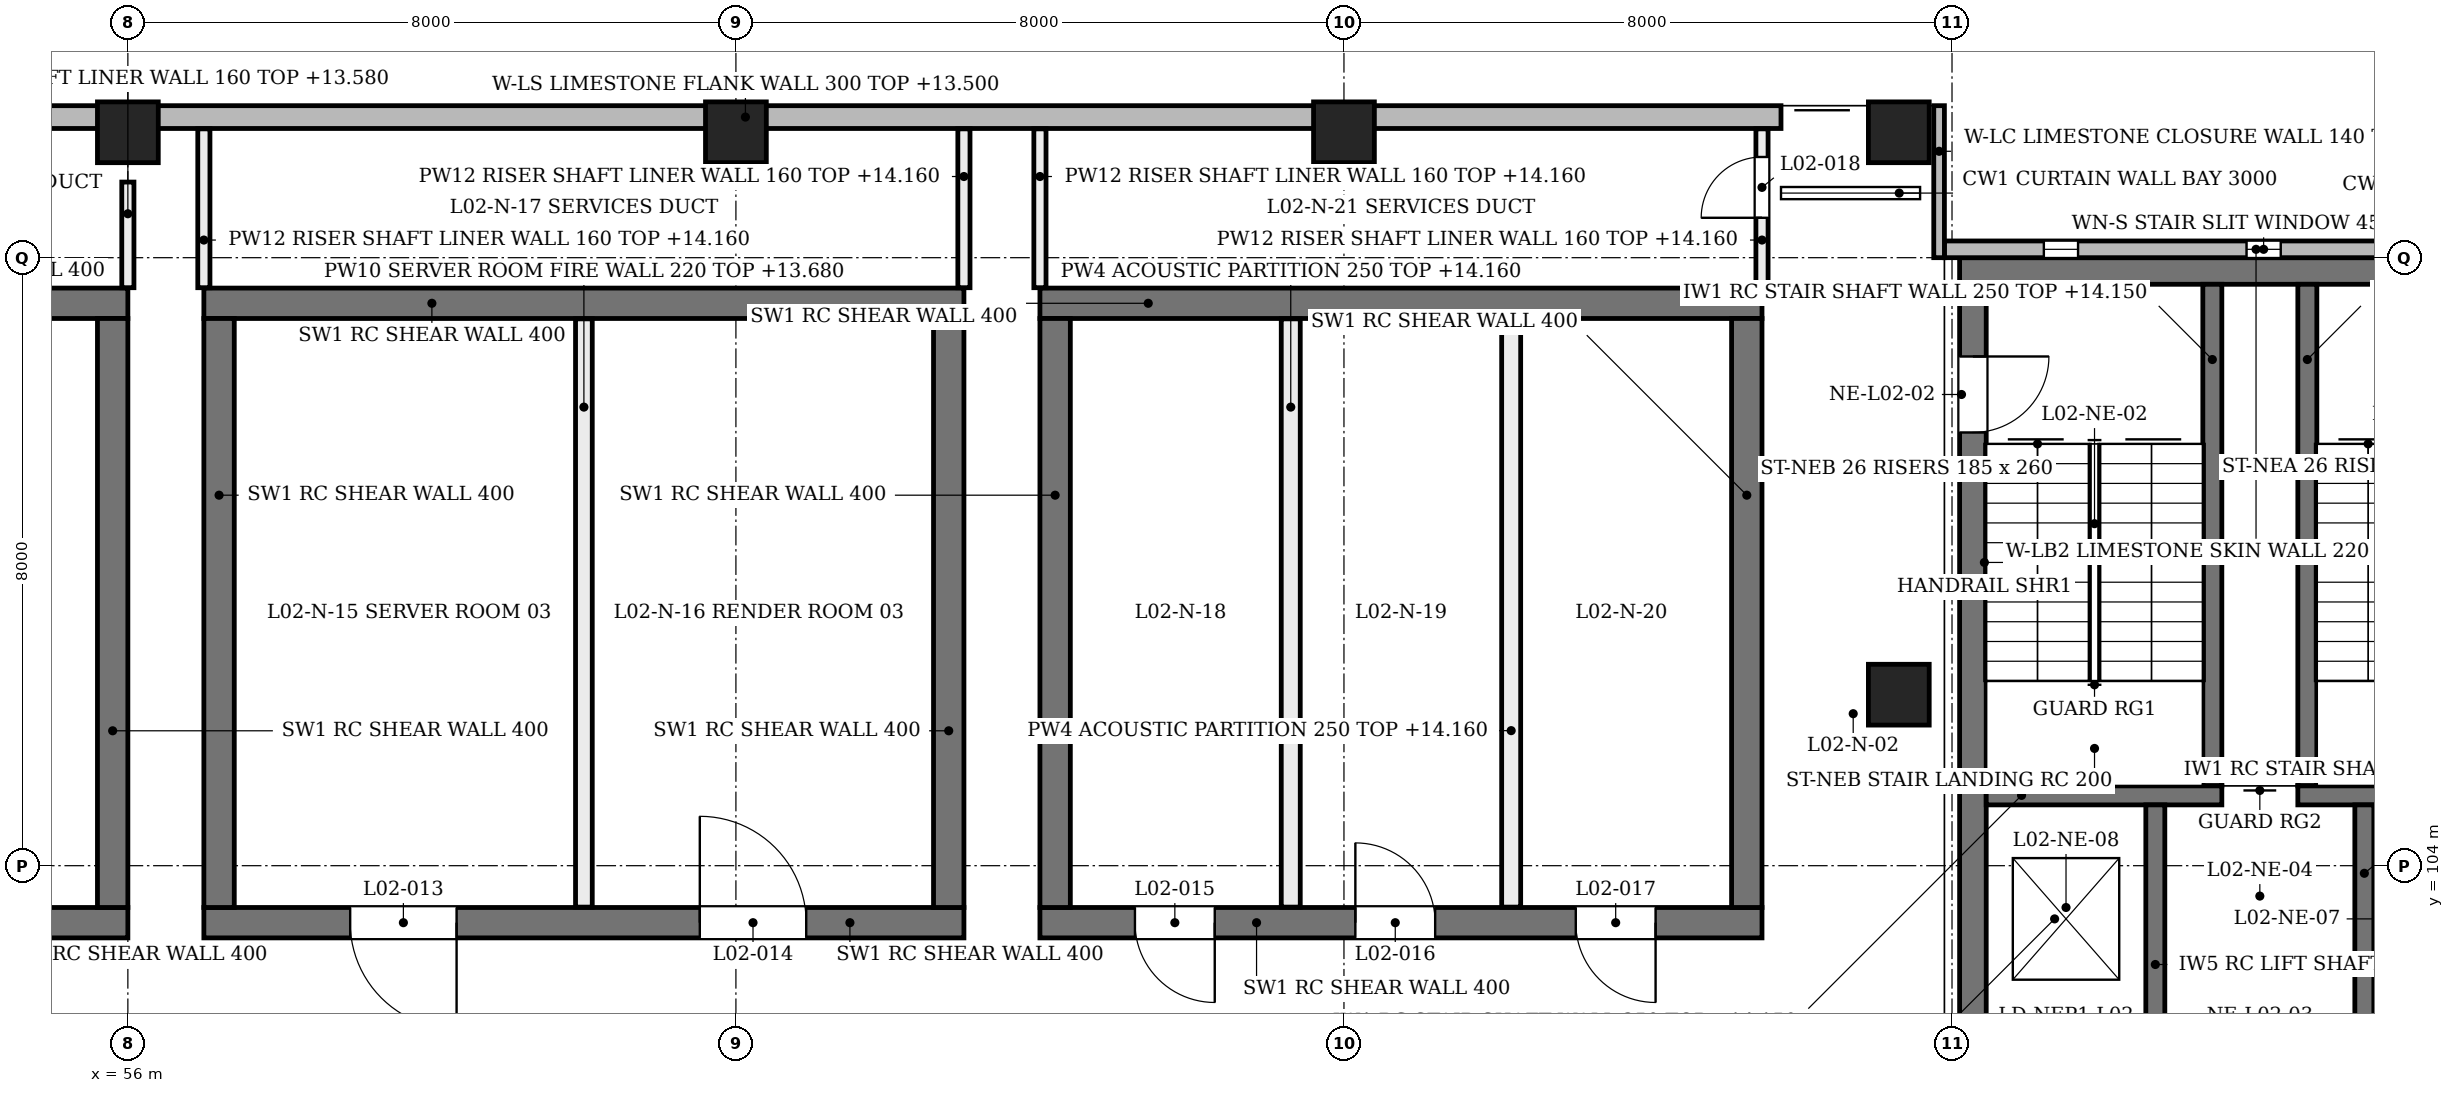
"""IFC4 building model, lengths in metres.
Left out: names, types, materials, properties, quantities, classifications, styles, units other than length and angle.
Written with IfcOpenShell. Run it as: python <this file> out.ifc"""

import sys

from ifc_helpers import new_model, si_unit, direction, frame, frame_2d, origin, origin_2d, place, context, subcontext, project, spatial, rectangle, extrude, element, fill, save


model = new_model("IFC4")
c1 = context("Model", 3, precision=1e-05, world=origin(), true_north=direction((0.0, 1.0)))
c2 = subcontext(c1, "Body", "Model", "MODEL_VIEW")
j1 = project(units=[si_unit("LENGTHUNIT", "METRE"), si_unit("PLANEANGLEUNIT", "RADIAN")], contexts=[c1])
p1 = place(None, origin())
s1 = spatial("IfcSite", under=j1, at=p1, CompositionType="ELEMENT")
p2 = place(p1, origin())
s2 = spatial("IfcBuilding", under=s1, at=p2, CompositionType="ELEMENT")
p3 = place(p2, frame((0.0, 0.0, 9.6)))
s3 = spatial("IfcBuildingStorey", under=s2, at=p3, CompositionType="ELEMENT", Elevation=9.6)
p4 = place(p3, frame((46.0, 103.25, 0.0), z_axis=(0.0, 0.0, 1.0), x_axis=(1.0, 0.0, 0.0)))
e1 = element("IfcWall", 1, at=p4, inside=s3, PredefinedType="SHEAR", context=c2, shape_type="SweptSolid", body=[
    extrude(rectangle(XDim=10.0, YDim=0.4, at=frame_2d((5.0, 0.0))), origin(), (0.0, 0.0, 1.0), 4.58),
])
p5 = place(p4, frame((2.025, 0.0, 0.0)))
e2 = element("IfcOpeningElement", 2, at=p5, cuts=e1, PredefinedType="OPENING", context=c2, shape_type="SweptSolid", body=[
    extrude(rectangle(XDim=1.2, YDim=2.2, at=frame_2d((0.6, 1.1))), frame((0.0, 0.21, 0.0), z_axis=(0.0, -1.0, 0.0), x_axis=(1.0, 0.0, 0.0)), (0.0, 0.0, 1.0), 0.42),
])
p6 = place(p4, frame((6.625, 0.0, 0.0)))
e3 = element("IfcOpeningElement", 3, at=p6, cuts=e1, PredefinedType="OPENING", context=c2, shape_type="SweptSolid", body=[
    extrude(rectangle(XDim=1.2, YDim=2.2, at=frame_2d((0.6, 1.1))), frame((0.0, 0.21, 0.0), z_axis=(0.0, -1.0, 0.0), x_axis=(1.0, 0.0, 0.0)), (0.0, 0.0, 1.0), 0.42),
])
p7 = place(p3, frame((46.0, 111.4, 0.0), z_axis=(0.0, 0.0, 1.0), x_axis=(1.0, 0.0, 0.0)))
e4 = element("IfcWall", 4, at=p7, inside=s3, PredefinedType="SHEAR", context=c2, shape_type="SweptSolid", body=[
    extrude(rectangle(XDim=10.0, YDim=0.4, at=frame_2d((5.0, 0.0))), origin(), (0.0, 0.0, 1.0), 4.58),
])
p8 = place(p3, frame((55.8, 103.45, 0.0), z_axis=(0.0, 0.0, 1.0), x_axis=(0.0, 1.0, 0.0)))
e5 = element("IfcWall", 5, at=p8, inside=s3, PredefinedType="SHEAR", context=c2, shape_type="SweptSolid", body=[
    extrude(rectangle(XDim=7.75, YDim=0.4, at=frame_2d((3.875, 0.0))), origin(), (0.0, 0.0, 1.0), 4.58),
])
p9 = place(p3, frame((57.0, 103.25, 0.0), z_axis=(0.0, 0.0, 1.0), x_axis=(1.0, 0.0, 0.0)))
e6 = element("IfcWall", 6, at=p9, inside=s3, PredefinedType="SHEAR", context=c2, shape_type="SweptSolid", body=[
    extrude(rectangle(XDim=10.0, YDim=0.4, at=frame_2d((5.0, 0.0))), origin(), (0.0, 0.0, 1.0), 4.58),
])
p10 = place(p9, frame((1.925, 0.0, 0.0)))
e7 = element("IfcOpeningElement", 7, at=p10, cuts=e6, PredefinedType="OPENING", context=c2, shape_type="SweptSolid", body=[
    extrude(rectangle(XDim=1.4, YDim=2.1, at=frame_2d((0.7, 1.05))), frame((0.0, 0.21, 0.0), z_axis=(0.0, -1.0, 0.0), x_axis=(1.0, 0.0, 0.0)), (0.0, 0.0, 1.0), 0.42),
])
p11 = place(p9, frame((6.525, 0.0, 0.0)))
e8 = element("IfcOpeningElement", 8, at=p11, cuts=e6, PredefinedType="OPENING", context=c2, shape_type="SweptSolid", body=[
    extrude(rectangle(XDim=1.4, YDim=2.1, at=frame_2d((0.7, 1.05))), frame((0.0, 0.21, 0.0), z_axis=(0.0, -1.0, 0.0), x_axis=(1.0, 0.0, 0.0)), (0.0, 0.0, 1.0), 0.42),
])
p12 = place(p3, frame((57.0, 111.4, 0.0), z_axis=(0.0, 0.0, 1.0), x_axis=(1.0, 0.0, 0.0)))
e9 = element("IfcWall", 9, at=p12, inside=s3, PredefinedType="SHEAR", context=c2, shape_type="SweptSolid", body=[
    extrude(rectangle(XDim=10.0, YDim=0.4, at=frame_2d((5.0, 0.0))), origin(), (0.0, 0.0, 1.0), 4.58),
])
for number, where, z_axis, x_axis in (
    (10, (57.2, 103.45, 0.0), (0.0, 0.0, 1.0), (0.0, 1.0, 0.0)),
    (11, (66.8, 103.45, 0.0), (0.0, 0.0, 1.0), (0.0, 1.0, 0.0)),
):
    element("IfcWall", number, at=place(p3, frame(where, z_axis=z_axis, x_axis=x_axis)), inside=s3, PredefinedType="SHEAR", context=c2, shape_type="SweptSolid", body=[
        extrude(rectangle(XDim=7.75, YDim=0.4, at=frame_2d((3.875, 0.0))), origin(), (0.0, 0.0, 1.0), 4.58),
    ])
p13 = place(p3, frame((68.0, 103.25, 0.0), z_axis=(0.0, 0.0, 1.0), x_axis=(1.0, 0.0, 0.0)))
e12 = element("IfcWall", 12, at=p13, inside=s3, PredefinedType="SHEAR", context=c2, shape_type="SweptSolid", body=[
    extrude(rectangle(XDim=9.5, YDim=0.4, at=frame_2d((4.75, 0.0))), origin(), (0.0, 0.0, 1.0), 4.58),
])
p14 = place(p13, frame((1.25, 0.0, 0.0)))
e13 = element("IfcOpeningElement", 13, at=p14, cuts=e12, PredefinedType="OPENING", context=c2, shape_type="SweptSolid", body=[
    extrude(rectangle(XDim=1.05, YDim=2.2, at=frame_2d((0.525, 1.1))), frame((0.0, 0.21, 0.0), z_axis=(0.0, -1.0, 0.0), x_axis=(1.0, 0.0, 0.0)), (0.0, 0.0, 1.0), 0.42),
])
p15 = place(p13, frame((4.15, 0.0, 0.0)))
e14 = element("IfcOpeningElement", 14, at=p15, cuts=e12, PredefinedType="OPENING", context=c2, shape_type="SweptSolid", body=[
    extrude(rectangle(XDim=1.05, YDim=2.2, at=frame_2d((0.525, 1.1))), frame((0.0, 0.21, 0.0), z_axis=(0.0, -1.0, 0.0), x_axis=(1.0, 0.0, 0.0)), (0.0, 0.0, 1.0), 0.42),
])
p16 = place(p13, frame((7.05, 0.0, 0.0)))
e15 = element("IfcOpeningElement", 15, at=p16, cuts=e12, PredefinedType="OPENING", context=c2, shape_type="SweptSolid", body=[
    extrude(rectangle(XDim=1.05, YDim=2.2, at=frame_2d((0.525, 1.1))), frame((0.0, 0.21, 0.0), z_axis=(0.0, -1.0, 0.0), x_axis=(1.0, 0.0, 0.0)), (0.0, 0.0, 1.0), 0.42),
])
p17 = place(p3, frame((68.0, 111.4, 0.0), z_axis=(0.0, 0.0, 1.0), x_axis=(1.0, 0.0, 0.0)))
e16 = element("IfcWall", 16, at=p17, inside=s3, PredefinedType="SHEAR", context=c2, shape_type="SweptSolid", body=[
    extrude(rectangle(XDim=9.5, YDim=0.4, at=frame_2d((4.75, 0.0))), origin(), (0.0, 0.0, 1.0), 4.58),
])
for number, where, z_axis, x_axis in (
    (17, (68.2, 103.45, 0.0), (0.0, 0.0, 1.0), (0.0, 1.0, 0.0)),
    (18, (77.3, 103.45, 0.0), (0.0, 0.0, 1.0), (0.0, 1.0, 0.0)),
):
    element("IfcWall", number, at=place(p3, frame(where, z_axis=z_axis, x_axis=x_axis)), inside=s3, PredefinedType="SHEAR", context=c2, shape_type="SweptSolid", body=[
        extrude(rectangle(XDim=7.75, YDim=0.4, at=frame_2d((3.875, 0.0))), origin(), (0.0, 0.0, 1.0), 4.58),
    ])
p18 = place(p3, frame((80.1, 111.825, 0.0), z_axis=(0.0, 0.0, 1.0), x_axis=(1.0, 0.0, 0.0)))
e19 = element("IfcWall", 19, at=p18, inside=s3, PredefinedType="SHEAR", context=c2, shape_type="SweptSolid", body=[
    extrude(rectangle(XDim=7.9, YDim=0.35, at=frame_2d((3.95, 0.0))), origin(), (0.0, 0.0, 1.0), 4.58),
])
p19 = place(p3, frame((80.275, 96.45, 0.0), z_axis=(0.0, 0.0, 1.0), x_axis=(0.0, 1.0, 0.0)))
e20 = element("IfcWall", 20, at=p19, inside=s3, PredefinedType="SHEAR", context=c2, shape_type="SweptSolid", body=[
    extrude(rectangle(XDim=15.2, YDim=0.35, at=frame_2d((7.6, 0.0))), origin(), (0.0, 0.0, 1.0), 4.58),
])
p20 = place(p19, frame((13.25, 0.0, 0.0)))
e21 = element("IfcOpeningElement", 21, at=p20, cuts=e20, PredefinedType="OPENING", context=c2, shape_type="SweptSolid", body=[
    extrude(rectangle(XDim=1.0, YDim=2.1, at=frame_2d((0.5, 1.05))), frame((0.0, 0.185, 0.0), z_axis=(0.0, -1.0, 0.0), x_axis=(1.0, 0.0, 0.0)), (0.0, 0.0, 1.0), 0.37),
])
p21 = place(p19, frame((3.6, 0.0, 0.0)))
e22 = element("IfcOpeningElement", 22, at=p21, cuts=e20, PredefinedType="OPENING", context=c2, shape_type="SweptSolid", body=[
    extrude(rectangle(XDim=1.0, YDim=2.1, at=frame_2d((0.5, 1.05))), frame((0.0, 0.185, 0.0), z_axis=(0.0, -1.0, 0.0), x_axis=(1.0, 0.0, 0.0)), (0.0, 0.0, 1.0), 0.37),
])
for number, where, z_axis, x_axis in (
    (23, (79.3, 106.0, 0.0), (0.0, 0.204, 0.979), (-1.0, 0.0, 0.0)),
    (24, (56.0, 113.4, 0.0), (0.0, 0.204, 0.979), (-1.0, 0.0, 0.0)),
    (25, (64.0, 113.4, 0.0), (0.0, 0.204, 0.979), (-1.0, 0.0, 0.0)),
    (26, (72.0, 113.4, 0.0), (0.0, 0.204, 0.979), (-1.0, 0.0, 0.0)),
    (27, (79.3, 113.4, 0.0), (0.0, 0.204, 0.979), (-1.0, 0.0, 0.0)),
):
    element("IfcColumn", number, at=place(p3, frame(where, z_axis=z_axis, x_axis=x_axis)), inside=s3, PredefinedType="COLUMN", context=c2, shape_type="SweptSolid", body=[
        extrude(rectangle(XDim=0.8, YDim=0.8, at=origin_2d()), origin(), (0.0, 0.0, 1.0), 4.903),
    ])
p22 = place(p3, frame((26.25, 113.85, 0.0), z_axis=(0.0, 0.0, 1.0), x_axis=(1.0, 0.0, 0.0)))
e28 = element("IfcWall", 28, at=p22, inside=s3, PredefinedType="SOLIDWALL", context=c2, shape_type="SweptSolid", body=[
    extrude(rectangle(XDim=51.5, YDim=0.3, at=frame_2d((25.75, 0.0))), origin(), (0.0, 0.0, 1.0), 3.9),
])
p23 = place(p3, frame((79.9, 112.11, 0.0), z_axis=(0.0, 0.0, 1.0), x_axis=(1.0, 0.0, 0.0)))
e29 = element("IfcWall", 29, at=p23, inside=s3, PredefinedType="SOLIDWALL", context=c2, shape_type="SweptSolid", body=[
    extrude(rectangle(XDim=8.2, YDim=0.22, at=frame_2d((4.1, 0.0))), origin(), (0.0, 0.0, 1.0), 3.9),
])
p24 = place(p23, frame((1.308, 0.0, 0.9)))
e30 = element("IfcOpeningElement", 30, at=p24, cuts=e29, PredefinedType="OPENING", context=c2, shape_type="SweptSolid", body=[
    extrude(rectangle(XDim=0.45, YDim=2.6, at=frame_2d((0.225, 1.3))), frame((0.0, 0.12, 0.0), z_axis=(0.0, -1.0, 0.0), x_axis=(1.0, 0.0, 0.0)), (0.0, 0.0, 1.0), 0.24),
])
p25 = place(p23, frame((3.975, 0.0, 0.9)))
e31 = element("IfcOpeningElement", 31, at=p25, cuts=e29, PredefinedType="OPENING", context=c2, shape_type="SweptSolid", body=[
    extrude(rectangle(XDim=0.45, YDim=2.6, at=frame_2d((0.225, 1.3))), frame((0.0, 0.12, 0.0), z_axis=(0.0, -1.0, 0.0), x_axis=(1.0, 0.0, 0.0)), (0.0, 0.0, 1.0), 0.24),
])
p26 = place(p23, frame((6.642, 0.0, 0.9)))
e32 = element("IfcOpeningElement", 32, at=p26, cuts=e29, PredefinedType="OPENING", context=c2, shape_type="SweptSolid", body=[
    extrude(rectangle(XDim=0.45, YDim=2.6, at=frame_2d((0.225, 1.3))), frame((0.0, 0.12, 0.0), z_axis=(0.0, -1.0, 0.0), x_axis=(1.0, 0.0, 0.0)), (0.0, 0.0, 1.0), 0.24),
])
p27 = place(p3, frame((79.83, 112.0, 0.0), z_axis=(0.0, 0.0, 1.0), x_axis=(0.0, 1.0, 0.0)))
e33 = element("IfcWall", 33, at=p27, inside=s3, PredefinedType="SOLIDWALL", context=c2, shape_type="SweptSolid", body=[
    extrude(rectangle(XDim=2.0, YDim=0.14, at=frame_2d((1.0, 0.0))), origin(), (0.0, 0.0, 1.0), 3.9),
])
for number, where, z_axis, x_axis in (
    (34, (84.675, 111.65, 0.0), (0.0, 0.0, 1.0), (0.0, -1.0, 0.0)),
    (35, (83.425, 111.65, 0.0), (0.0, 0.0, 1.0), (0.0, -1.0, 0.0)),
):
    element("IfcWall", number, at=place(p3, frame(where, z_axis=z_axis, x_axis=x_axis)), inside=s3, PredefinedType="SOLIDWALL", context=c2, shape_type="SweptSolid", body=[
        extrude(rectangle(XDim=6.6, YDim=0.25, at=frame_2d((3.3, 0.0))), origin(), (0.0, 0.0, 1.0), 4.55),
    ])
p28 = place(p3, frame((87.65, 104.925, 0.0), z_axis=(0.0, 0.0, 1.0), x_axis=(-1.0, 0.0, 0.0)))
e36 = element("IfcWall", 36, at=p28, inside=s3, PredefinedType="SOLIDWALL", context=c2, shape_type="SweptSolid", body=[
    extrude(rectangle(XDim=3.1, YDim=0.25, at=frame_2d((1.55, 0.0))), origin(), (0.0, 0.0, 1.0), 4.55),
])
p29 = place(p3, frame((83.55, 104.925, 0.0), z_axis=(0.0, 0.0, 1.0), x_axis=(-1.0, 0.0, 0.0)))
e37 = element("IfcWall", 37, at=p29, inside=s3, PredefinedType="SOLIDWALL", context=c2, shape_type="SweptSolid", body=[
    extrude(rectangle(XDim=3.1, YDim=0.25, at=frame_2d((1.55, 0.0))), origin(), (0.0, 0.0, 1.0), 4.55),
])
for number, where, z_axis, x_axis in (
    (38, (85.425, 104.8, 0.0), (0.0, 0.0, 1.0), (0.0, -1.0, 0.0)),
    (39, (82.675, 104.8, 0.0), (0.0, 0.0, 1.0), (0.0, -1.0, 0.0)),
):
    element("IfcWall", number, at=place(p3, frame(where, z_axis=z_axis, x_axis=x_axis)), inside=s3, PredefinedType="SOLIDWALL", context=c2, shape_type="SweptSolid", body=[
        extrude(rectangle(XDim=3.0, YDim=0.25, at=frame_2d((1.5, 0.0))), origin(), (0.0, 0.0, 1.0), 4.55),
    ])
p30 = place(p3, frame((77.5, 111.605, 0.0), z_axis=(0.0, 0.0, 1.0), x_axis=(0.0, 1.0, 0.0)))
e40 = element("IfcWall", 40, at=p30, inside=s3, PredefinedType="PARTITIONING", context=c2, shape_type="SweptSolid", body=[
    extrude(rectangle(XDim=2.09, YDim=0.16, at=frame_2d((1.045, 0.0))), origin(), (0.0, 0.0, 1.0), 4.56),
])
p31 = place(p30, frame((0.92, 0.0, 0.0)))
e41 = element("IfcOpeningElement", 41, at=p31, cuts=e40, PredefinedType="OPENING", context=c2, shape_type="SweptSolid", body=[
    extrude(rectangle(XDim=0.8, YDim=2.1, at=frame_2d((0.4, 1.05))), frame((0.0, 0.09, 0.0), z_axis=(0.0, -1.0, 0.0), x_axis=(1.0, 0.0, 0.0)), (0.0, 0.0, 1.0), 0.18),
])
p32 = place(p3, frame((56.0, 111.605, 0.0), z_axis=(0.0, 0.0, 1.0), x_axis=(0.0, 1.0, 0.0)))
e42 = element("IfcWall", 42, at=p32, inside=s3, PredefinedType="PARTITIONING", context=c2, shape_type="SweptSolid", body=[
    extrude(rectangle(XDim=1.39, YDim=0.16, at=frame_2d((0.695, 0.0))), origin(), (0.0, 0.0, 1.0), 3.98),
])
p33 = place(p3, frame((62.0, 103.455, 0.0), z_axis=(0.0, 0.0, 1.0), x_axis=(0.0, 1.0, 0.0)))
e43 = element("IfcWall", 43, at=p33, inside=s3, PredefinedType="PARTITIONING", context=c2, shape_type="SweptSolid", body=[
    extrude(rectangle(XDim=7.74, YDim=0.22, at=frame_2d((3.87, 0.0))), origin(), (0.0, 0.0, 1.0), 4.08),
])
for number, where, z_axis, x_axis in (
    (44, (57.0, 111.605, 0.0), (0.0, 0.0, 1.0), (0.0, 1.0, 0.0)),
    (45, (67.0, 111.605, 0.0), (0.0, 0.0, 1.0), (0.0, 1.0, 0.0)),
):
    element("IfcWall", number, at=place(p3, frame(where, z_axis=z_axis, x_axis=x_axis)), inside=s3, PredefinedType="PARTITIONING", context=c2, shape_type="SweptSolid", body=[
        extrude(rectangle(XDim=2.09, YDim=0.16, at=frame_2d((1.045, 0.0))), origin(), (0.0, 0.0, 1.0), 4.56),
    ])
for number, where, z_axis, x_axis in (
    (46, (71.3, 103.455, 0.0), (0.0, 0.0, 1.0), (0.0, 1.0, 0.0)),
    (47, (74.2, 103.455, 0.0), (0.0, 0.0, 1.0), (0.0, 1.0, 0.0)),
):
    element("IfcWall", number, at=place(p3, frame(where, z_axis=z_axis, x_axis=x_axis)), inside=s3, PredefinedType="PARTITIONING", context=c2, shape_type="SweptSolid", body=[
        extrude(rectangle(XDim=7.74, YDim=0.25, at=frame_2d((3.87, 0.0))), origin(), (0.0, 0.0, 1.0), 4.56),
    ])
p34 = place(p3, frame((68.0, 111.605, 0.0), z_axis=(0.0, 0.0, 1.0), x_axis=(0.0, 1.0, 0.0)))
e48 = element("IfcWall", 48, at=p34, inside=s3, PredefinedType="PARTITIONING", context=c2, shape_type="SweptSolid", body=[
    extrude(rectangle(XDim=2.09, YDim=0.16, at=frame_2d((1.045, 0.0))), origin(), (0.0, 0.0, 1.0), 4.56),
])
p35 = place(p24, origin())
e49 = element("IfcWindow", 49, at=p35, inside=s3, PartitioningType="SINGLE_PANEL", PredefinedType="WINDOW", context=c2, shape_type="SweptSolid", body=[
    extrude(rectangle(XDim=0.45, YDim=2.6, at=frame_2d((0.225, 1.3))), frame((0.0, 0.03, 0.0), z_axis=(0.0, -1.0, 0.0), x_axis=(1.0, 0.0, 0.0)), (0.0, 0.0, 1.0), 0.06),
])
fill(e30, e49)
p36 = place(p25, origin())
e50 = element("IfcWindow", 50, at=p36, inside=s3, PartitioningType="SINGLE_PANEL", PredefinedType="WINDOW", context=c2, shape_type="SweptSolid", body=[
    extrude(rectangle(XDim=0.45, YDim=2.6, at=frame_2d((0.225, 1.3))), frame((0.0, 0.03, 0.0), z_axis=(0.0, -1.0, 0.0), x_axis=(1.0, 0.0, 0.0)), (0.0, 0.0, 1.0), 0.06),
])
fill(e31, e50)
p37 = place(p20, origin())
e51 = element("IfcDoor", 51, at=p37, inside=s3, OperationType="SINGLE_SWING_RIGHT", PredefinedType="DOOR", context=c2, shape_type="SweptSolid", body=[
    extrude(rectangle(XDim=1.0, YDim=2.1, at=frame_2d((0.5, 1.05))), frame((0.0, 0.025, 0.0), z_axis=(0.0, -1.0, 0.0), x_axis=(1.0, 0.0, 0.0)), (0.0, 0.0, 1.0), 0.05),
])
fill(e21, e51)
p38 = place(p10, origin())
e52 = element("IfcDoor", 52, at=p38, inside=s3, OperationType="SINGLE_SWING_RIGHT", PredefinedType="DOOR", context=c2, shape_type="SweptSolid", body=[
    extrude(rectangle(XDim=1.4, YDim=2.1, at=frame_2d((0.7, 1.05))), frame((0.0, 0.025, 0.0), z_axis=(0.0, -1.0, 0.0), x_axis=(1.0, 0.0, 0.0)), (0.0, 0.0, 1.0), 0.05),
])
fill(e7, e52)
p39 = place(p11, origin())
e53 = element("IfcDoor", 53, at=p39, inside=s3, OperationType="SINGLE_SWING_LEFT", PredefinedType="DOOR", context=c2, shape_type="SweptSolid", body=[
    extrude(rectangle(XDim=1.4, YDim=2.1, at=frame_2d((0.7, 1.05))), frame((0.0, 0.025, 0.0), z_axis=(0.0, -1.0, 0.0), x_axis=(1.0, 0.0, 0.0)), (0.0, 0.0, 1.0), 0.05),
])
fill(e8, e53)
p40 = place(p14, origin())
e54 = element("IfcDoor", 54, at=p40, inside=s3, OperationType="SINGLE_SWING_RIGHT", PredefinedType="DOOR", context=c2, shape_type="SweptSolid", body=[
    extrude(rectangle(XDim=1.05, YDim=2.2, at=frame_2d((0.525, 1.1))), frame((0.0, 0.025, 0.0), z_axis=(0.0, -1.0, 0.0), x_axis=(1.0, 0.0, 0.0)), (0.0, 0.0, 1.0), 0.05),
])
fill(e13, e54)
p41 = place(p15, origin())
e55 = element("IfcDoor", 55, at=p41, inside=s3, OperationType="SINGLE_SWING_LEFT", PredefinedType="DOOR", context=c2, shape_type="SweptSolid", body=[
    extrude(rectangle(XDim=1.05, YDim=2.2, at=frame_2d((0.525, 1.1))), frame((0.0, 0.025, 0.0), z_axis=(0.0, -1.0, 0.0), x_axis=(1.0, 0.0, 0.0)), (0.0, 0.0, 1.0), 0.05),
])
fill(e14, e55)
p42 = place(p16, origin())
e56 = element("IfcDoor", 56, at=p42, inside=s3, OperationType="SINGLE_SWING_RIGHT", PredefinedType="DOOR", context=c2, shape_type="SweptSolid", body=[
    extrude(rectangle(XDim=1.05, YDim=2.2, at=frame_2d((0.525, 1.1))), frame((0.0, 0.025, 0.0), z_axis=(0.0, -1.0, 0.0), x_axis=(1.0, 0.0, 0.0)), (0.0, 0.0, 1.0), 0.05),
])
fill(e15, e56)
p43 = place(p31, origin())
e57 = element("IfcDoor", 57, at=p43, inside=s3, OperationType="SINGLE_SWING_LEFT", PredefinedType="DOOR", context=c2, shape_type="SweptSolid", body=[
    extrude(rectangle(XDim=0.8, YDim=2.1, at=frame_2d((0.4, 1.05))), frame((0.0, 0.025, 0.0), z_axis=(0.0, -1.0, 0.0), x_axis=(1.0, 0.0, 0.0)), (0.0, 0.0, 1.0), 0.05),
])
fill(e41, e57)
save(model, sys.argv[1])
